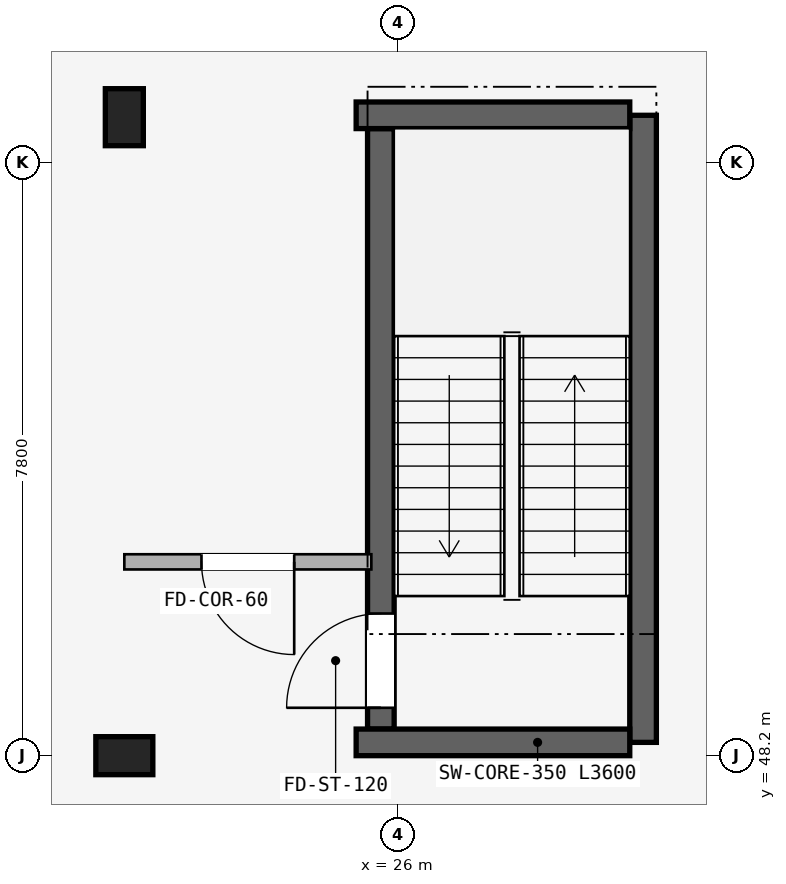
"""IFC4 building model, lengths in metres.
Left out: names, types, materials, properties, quantities, classifications, styles, units other than length and angle.
Written with IfcOpenShell. Run it as: python <this file> out.ifc"""

import sys

from ifc_helpers import new_model, si_unit, direction, frame, frame_2d, origin, origin_2d, place, context, subcontext, project, spatial, rectangle, extrude, element, fill, save


model = new_model("IFC4")
c1 = context("Model", 3, precision=1e-05, world=origin(), true_north=direction((0.0, 1.0)))
c2 = subcontext(c1, "Body", "Model", "MODEL_VIEW")
j1 = project(units=[si_unit("LENGTHUNIT", "METRE"), si_unit("PLANEANGLEUNIT", "RADIAN")], contexts=[c1])
p1 = place(None, origin())
s1 = spatial("IfcSite", under=j1, at=p1, CompositionType="ELEMENT")
p2 = place(p1, origin())
s2 = spatial("IfcBuilding", under=s1, at=p2, CompositionType="ELEMENT")
p3 = place(p2, frame((0.0, 0.0, -4.5)))
s3 = spatial("IfcBuildingStorey", under=s2, at=p3, CompositionType="ELEMENT", Elevation=-4.5)
p4 = place(p3, frame((29.225, 48.375, -0.5), z_axis=(0.0, 0.0, 1.0), x_axis=(0.0, 1.0, 0.0)))
e1 = element("IfcWall", 1, at=p4, inside=s3, PredefinedType="SHEAR", context=c2, shape_type="SweptSolid", body=[
    extrude(rectangle(XDim=8.25, YDim=0.35, at=frame_2d((4.125, 0.0))), origin(), (0.0, 0.0, 1.0), 4.78),
])
p5 = place(p3, frame((25.775, 48.55, 0.0), z_axis=(0.0, 0.0, 1.0), x_axis=(0.0, 1.0, 0.0)))
e2 = element("IfcWall", 2, at=p5, inside=s3, PredefinedType="SHEAR", context=c2, shape_type="SweptSolid", body=[
    extrude(rectangle(XDim=7.9, YDim=0.35, at=frame_2d((3.95, 0.0))), origin(), (0.0, 0.0, 1.0), 4.28),
])
p6 = place(p5, frame((0.28, 0.0, 0.0)))
e3 = element("IfcOpeningElement", 3, at=p6, cuts=e2, PredefinedType="OPENING", context=c2, shape_type="SweptSolid", body=[
    extrude(rectangle(XDim=1.24, YDim=2.15, at=frame_2d((0.62, 1.075))), frame((0.0, 0.185, 0.0), z_axis=(0.0, -1.0, 0.0), x_axis=(1.0, 0.0, 0.0)), (0.0, 0.0, 1.0), 0.37),
])
for number, where, z_axis, x_axis in (
    (4, (29.05, 48.375, -0.5), (0.0, 0.0, 1.0), (-1.0, 0.0, 0.0)),
    (5, (29.05, 56.625, -0.5), (0.0, 0.0, 1.0), (-1.0, 0.0, 0.0)),
):
    element("IfcWall", number, at=place(p3, frame(where, z_axis=z_axis, x_axis=x_axis)), inside=s3, PredefinedType="SHEAR", context=c2, shape_type="SweptSolid", body=[
        extrude(rectangle(XDim=3.6, YDim=0.35, at=frame_2d((1.8, 0.0))), origin(), (0.0, 0.0, 1.0), 4.78),
    ])
for number, where, z_axis, x_axis in (
    (6, (22.4, 48.2, -0.5), (0.0, 0.0, 1.0), (0.0, 1.0, 0.0)),
    (7, (22.4, 56.6, -0.5), (0.0, 0.0, 1.0), (1.0, 0.0, 0.0)),
):
    element("IfcColumn", number, at=place(p3, frame(where, z_axis=z_axis, x_axis=x_axis)), inside=s3, PredefinedType="COLUMN", context=c2, shape_type="SweptSolid", body=[
        extrude(rectangle(XDim=0.5, YDim=0.75, at=origin_2d()), origin(), (0.0, 0.0, 1.0), 4.78),
    ])
p7 = place(p3, frame((25.65, 50.75, 0.0), z_axis=(0.0, 0.0, 1.0), x_axis=(-1.0, 0.0, 0.0)))
e8 = element("IfcWall", 8, at=p7, inside=s3, PredefinedType="STANDARD", context=c2, shape_type="SweptSolid", body=[
    extrude(rectangle(XDim=3.25, YDim=0.2, at=frame_2d((1.625, 0.0))), origin(), (0.0, 0.0, 1.0), 3.622),
])
p8 = place(p7, frame((1.015, 0.0, 0.0)))
e9 = element("IfcOpeningElement", 9, at=p8, cuts=e8, PredefinedType="OPENING", context=c2, shape_type="SweptSolid", body=[
    extrude(rectangle(XDim=1.22, YDim=2.15, at=frame_2d((0.61, 1.075))), frame((0.0, 0.11, 0.0), z_axis=(0.0, -1.0, 0.0), x_axis=(1.0, 0.0, 0.0)), (0.0, 0.0, 1.0), 0.22),
])
p9 = place(p6, frame((1.24, 0.0, 0.0), z_axis=(0.0, 0.0, 1.0), x_axis=(-1.0, 0.0, 0.0)))
e10 = element("IfcDoor", 10, at=p9, inside=s3, OperationType="SINGLE_SWING_RIGHT", PredefinedType="DOOR", context=c2, shape_type="SweptSolid", body=[
    extrude(rectangle(XDim=1.24, YDim=2.15, at=frame_2d((0.62, 1.075))), frame((0.0, 0.025, 0.0), z_axis=(0.0, -1.0, 0.0), x_axis=(1.0, 0.0, 0.0)), (0.0, 0.0, 1.0), 0.05),
])
fill(e3, e10)
p10 = place(p8, frame((1.22, 0.0, 0.0), z_axis=(0.0, 0.0, 1.0), x_axis=(-1.0, 0.0, 0.0)))
e11 = element("IfcDoor", 11, at=p10, inside=s3, OperationType="SINGLE_SWING_RIGHT", PredefinedType="DOOR", context=c2, shape_type="SweptSolid", body=[
    extrude(rectangle(XDim=1.22, YDim=2.15, at=frame_2d((0.61, 1.075))), frame((0.0, 0.025, 0.0), z_axis=(0.0, -1.0, 0.0), x_axis=(1.0, 0.0, 0.0)), (0.0, 0.0, 1.0), 0.05),
])
fill(e9, e11)
save(model, sys.argv[1])
